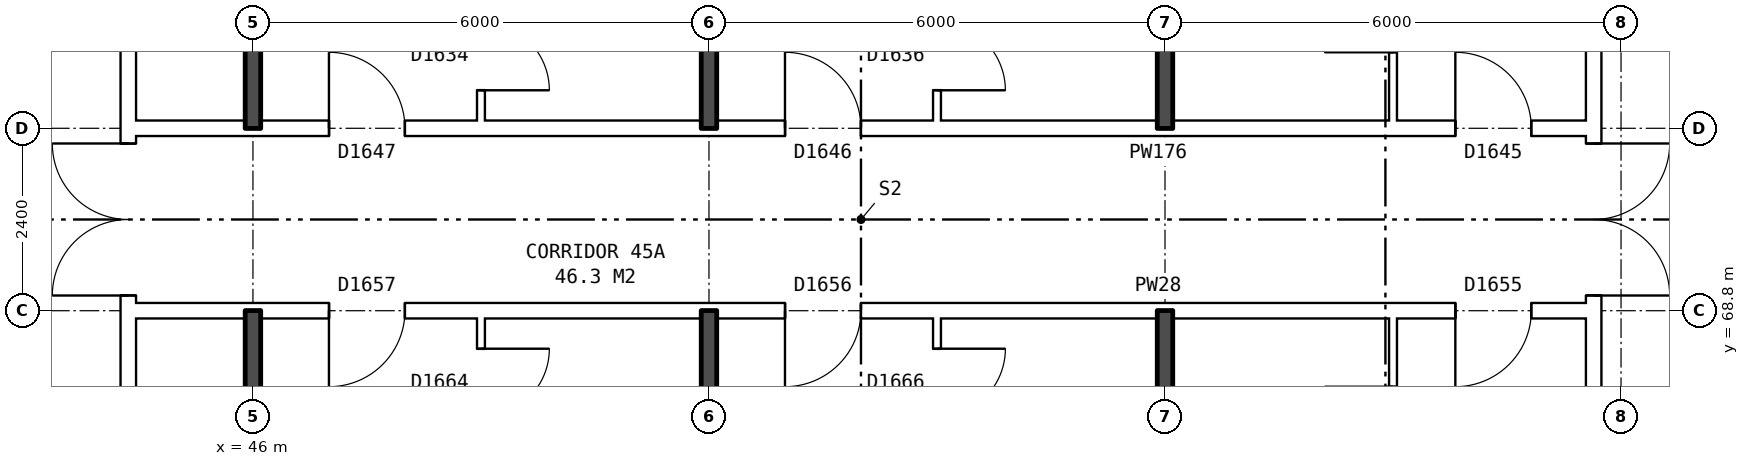
"""IFC4 building model, lengths in metres.
Left out: names, types, materials, properties, quantities, classifications, styles, units other than length and angle.
Written with IfcOpenShell. Run it as: python <this file> out.ifc"""

import sys

from ifc_helpers import new_model, si_unit, direction, frame, frame_2d, origin, place, context, subcontext, project, spatial, rectangle, extrude, element, fill, save


model = new_model("IFC4")
c1 = context("Model", 3, precision=1e-05, world=origin(), true_north=direction((0.0, 1.0)))
c2 = subcontext(c1, "Body", "Model", "MODEL_VIEW")
j1 = project(units=[si_unit("LENGTHUNIT", "METRE"), si_unit("PLANEANGLEUNIT", "RADIAN")], contexts=[c1])
p1 = place(None, origin())
s1 = spatial("IfcSite", under=j1, at=p1, CompositionType="ELEMENT")
p2 = place(p1, origin())
s2 = spatial("IfcBuilding", under=s1, at=p2, CompositionType="ELEMENT")
p3 = place(p2, frame((0.0, 0.0, 160.9)))
s3 = spatial("IfcBuildingStorey", under=s2, at=p3, CompositionType="ELEMENT", Elevation=160.9)
p4 = place(p3, frame((63.64, 63.9, 0.0), z_axis=(0.0, 0.0, 1.0), x_axis=(0.0, 1.0, 0.0)))
e1 = element("IfcWall", 1, at=p4, inside=s3, PredefinedType="PARTITIONING", context=c2, shape_type="SweptSolid", body=[
    extrude(rectangle(XDim=12.2, YDim=0.2, at=frame_2d((6.1, 0.0))), origin(), (0.0, 0.0, 1.0), 2.85),
])
p5 = place(p4, frame((5.1, 0.0, 0.0)))
e2 = element("IfcOpeningElement", 2, at=p5, cuts=e1, PredefinedType="OPENING", context=c2, shape_type="SweptSolid", body=[
    extrude(rectangle(XDim=2.0, YDim=2.1, at=frame_2d((1.0, 1.05))), frame((0.0, 0.11, 0.0), z_axis=(0.0, -1.0, 0.0), x_axis=(1.0, 0.0, 0.0)), (0.0, 0.0, 1.0), 0.22),
])
p6 = place(p3, frame((44.36, 63.9, 0.0), z_axis=(0.0, 0.0, 1.0), x_axis=(0.0, 1.0, 0.0)))
e3 = element("IfcWall", 3, at=p6, inside=s3, PredefinedType="PARTITIONING", context=c2, shape_type="SweptSolid", body=[
    extrude(rectangle(XDim=12.2, YDim=0.2, at=frame_2d((6.1, 0.0))), origin(), (0.0, 0.0, 1.0), 2.85),
])
p7 = place(p6, frame((5.1, 0.0, 0.0)))
e4 = element("IfcOpeningElement", 4, at=p7, cuts=e3, PredefinedType="OPENING", context=c2, shape_type="SweptSolid", body=[
    extrude(rectangle(XDim=2.0, YDim=2.1, at=frame_2d((1.0, 1.05))), frame((0.0, 0.11, 0.0), z_axis=(0.0, -1.0, 0.0), x_axis=(1.0, 0.0, 0.0)), (0.0, 0.0, 1.0), 0.22),
])
p8 = place(p3, frame((44.36, 68.8, 0.0), z_axis=(0.0, 0.0, 1.0), x_axis=(1.0, 0.0, 0.0)))
e5 = element("IfcWall", 5, at=p8, inside=s3, PredefinedType="PARTITIONING", context=c2, shape_type="SweptSolid", body=[
    extrude(rectangle(XDim=19.28, YDim=0.2, at=frame_2d((9.64, 0.0))), origin(), (0.0, 0.0, 1.0), 2.85),
])
p9 = place(p8, frame((17.46, 0.0, 0.0)))
e6 = element("IfcOpeningElement", 6, at=p9, cuts=e5, PredefinedType="OPENING", context=c2, shape_type="SweptSolid", body=[
    extrude(rectangle(XDim=1.0, YDim=2.1, at=frame_2d((0.5, 1.05))), frame((0.0, 0.11, 0.0), z_axis=(0.0, -1.0, 0.0), x_axis=(1.0, 0.0, 0.0)), (0.0, 0.0, 1.0), 0.22),
])
p10 = place(p8, frame((8.64, 0.0, 0.0)))
e7 = element("IfcOpeningElement", 7, at=p10, cuts=e5, PredefinedType="OPENING", context=c2, shape_type="SweptSolid", body=[
    extrude(rectangle(XDim=1.0, YDim=2.1, at=frame_2d((0.5, 1.05))), frame((0.0, 0.11, 0.0), z_axis=(0.0, -1.0, 0.0), x_axis=(1.0, 0.0, 0.0)), (0.0, 0.0, 1.0), 0.22),
])
p11 = place(p8, frame((2.64, 0.0, 0.0)))
e8 = element("IfcOpeningElement", 8, at=p11, cuts=e5, PredefinedType="OPENING", context=c2, shape_type="SweptSolid", body=[
    extrude(rectangle(XDim=1.0, YDim=2.1, at=frame_2d((0.5, 1.05))), frame((0.0, 0.11, 0.0), z_axis=(0.0, -1.0, 0.0), x_axis=(1.0, 0.0, 0.0)), (0.0, 0.0, 1.0), 0.22),
])
p12 = place(p3, frame((44.36, 71.2, 0.0), z_axis=(0.0, 0.0, 1.0), x_axis=(1.0, 0.0, 0.0)))
e9 = element("IfcWall", 9, at=p12, inside=s3, PredefinedType="PARTITIONING", context=c2, shape_type="SweptSolid", body=[
    extrude(rectangle(XDim=19.28, YDim=0.2, at=frame_2d((9.64, 0.0))), origin(), (0.0, 0.0, 1.0), 2.85),
])
p13 = place(p12, frame((17.46, 0.0, 0.0)))
e10 = element("IfcOpeningElement", 10, at=p13, cuts=e9, PredefinedType="OPENING", context=c2, shape_type="SweptSolid", body=[
    extrude(rectangle(XDim=1.0, YDim=2.1, at=frame_2d((0.5, 1.05))), frame((0.0, 0.11, 0.0), z_axis=(0.0, -1.0, 0.0), x_axis=(1.0, 0.0, 0.0)), (0.0, 0.0, 1.0), 0.22),
])
p14 = place(p12, frame((8.64, 0.0, 0.0)))
e11 = element("IfcOpeningElement", 11, at=p14, cuts=e9, PredefinedType="OPENING", context=c2, shape_type="SweptSolid", body=[
    extrude(rectangle(XDim=1.0, YDim=2.1, at=frame_2d((0.5, 1.05))), frame((0.0, 0.11, 0.0), z_axis=(0.0, -1.0, 0.0), x_axis=(1.0, 0.0, 0.0)), (0.0, 0.0, 1.0), 0.22),
])
p15 = place(p12, frame((2.64, 0.0, 0.0)))
e12 = element("IfcOpeningElement", 12, at=p15, cuts=e9, PredefinedType="OPENING", context=c2, shape_type="SweptSolid", body=[
    extrude(rectangle(XDim=1.0, YDim=2.1, at=frame_2d((0.5, 1.05))), frame((0.0, 0.11, 0.0), z_axis=(0.0, -1.0, 0.0), x_axis=(1.0, 0.0, 0.0)), (0.0, 0.0, 1.0), 0.22),
])
for number, where, z_axis, x_axis in (
    (13, (46.0, 63.8, 0.0), (0.0, 0.0, 1.0), (0.0, 1.0, 0.0)),
    (14, (46.0, 71.2, 0.0), (0.0, 0.0, 1.0), (0.0, 1.0, 0.0)),
):
    element("IfcWall", number, at=place(p3, frame(where, z_axis=z_axis, x_axis=x_axis)), inside=s3, PredefinedType="SOLIDWALL", context=c2, shape_type="SweptSolid", body=[
        extrude(rectangle(XDim=5.0, YDim=0.2, at=frame_2d((2.5, 0.0))), origin(), (0.0, 0.0, 1.0), 2.85),
    ])
p16 = place(p3, frame((49.0, 54.36, 0.0), z_axis=(0.0, 0.0, 1.0), x_axis=(0.0, 1.0, 0.0)))
e15 = element("IfcWall", 15, at=p16, inside=s3, PredefinedType="PARTITIONING", context=c2, shape_type="SweptSolid", body=[
    extrude(rectangle(XDim=14.34, YDim=0.1, at=frame_2d((7.17, 0.0))), origin(), (0.0, 0.0, 1.0), 2.85),
])
p17 = place(p16, frame((5.5, 0.0, 0.0)))
e16 = element("IfcOpeningElement", 16, at=p17, cuts=e15, PredefinedType="OPENING", context=c2, shape_type="SweptSolid", body=[
    extrude(rectangle(XDim=0.9, YDim=2.1, at=frame_2d((0.45, 1.05))), frame((0.0, 0.06, 0.0), z_axis=(0.0, -1.0, 0.0), x_axis=(1.0, 0.0, 0.0)), (0.0, 0.0, 1.0), 0.12),
])
p18 = place(p16, frame((13.04, 0.0, 0.0)))
e17 = element("IfcOpeningElement", 17, at=p18, cuts=e15, PredefinedType="OPENING", context=c2, shape_type="SweptSolid", body=[
    extrude(rectangle(XDim=0.9, YDim=2.1, at=frame_2d((0.45, 1.05))), frame((0.0, 0.06, 0.0), z_axis=(0.0, -1.0, 0.0), x_axis=(1.0, 0.0, 0.0)), (0.0, 0.0, 1.0), 0.12),
])
p19 = place(p3, frame((49.0, 71.3, 0.0), z_axis=(0.0, 0.0, 1.0), x_axis=(0.0, 1.0, 0.0)))
e18 = element("IfcWall", 18, at=p19, inside=s3, PredefinedType="PARTITIONING", context=c2, shape_type="SweptSolid", body=[
    extrude(rectangle(XDim=14.34, YDim=0.1, at=frame_2d((7.17, 0.0))), origin(), (0.0, 0.0, 1.0), 2.85),
])
p20 = place(p19, frame((7.94, 0.0, 0.0)))
e19 = element("IfcOpeningElement", 19, at=p20, cuts=e18, PredefinedType="OPENING", context=c2, shape_type="SweptSolid", body=[
    extrude(rectangle(XDim=0.9, YDim=2.1, at=frame_2d((0.45, 1.05))), frame((0.0, 0.06, 0.0), z_axis=(0.0, -1.0, 0.0), x_axis=(1.0, 0.0, 0.0)), (0.0, 0.0, 1.0), 0.12),
])
p21 = place(p19, frame((0.4, 0.0, 0.0)))
e20 = element("IfcOpeningElement", 20, at=p21, cuts=e18, PredefinedType="OPENING", context=c2, shape_type="SweptSolid", body=[
    extrude(rectangle(XDim=0.9, YDim=2.1, at=frame_2d((0.45, 1.05))), frame((0.0, 0.06, 0.0), z_axis=(0.0, -1.0, 0.0), x_axis=(1.0, 0.0, 0.0)), (0.0, 0.0, 1.0), 0.12),
])
for number, where, z_axis, x_axis in (
    (21, (52.0, 54.36, 0.0), (0.0, 0.0, 1.0), (0.0, 1.0, 0.0)),
    (22, (52.0, 71.2, 0.0), (0.0, 0.0, 1.0), (0.0, 1.0, 0.0)),
):
    element("IfcWall", number, at=place(p3, frame(where, z_axis=z_axis, x_axis=x_axis)), inside=s3, PredefinedType="SOLIDWALL", context=c2, shape_type="SweptSolid", body=[
        extrude(rectangle(XDim=14.44, YDim=0.2, at=frame_2d((7.22, 0.0))), origin(), (0.0, 0.0, 1.0), 2.85),
    ])
p22 = place(p3, frame((55.0, 54.36, 0.0), z_axis=(0.0, 0.0, 1.0), x_axis=(0.0, 1.0, 0.0)))
e23 = element("IfcWall", 23, at=p22, inside=s3, PredefinedType="PARTITIONING", context=c2, shape_type="SweptSolid", body=[
    extrude(rectangle(XDim=14.34, YDim=0.1, at=frame_2d((7.17, 0.0))), origin(), (0.0, 0.0, 1.0), 2.85),
])
p23 = place(p22, frame((5.5, 0.0, 0.0)))
e24 = element("IfcOpeningElement", 24, at=p23, cuts=e23, PredefinedType="OPENING", context=c2, shape_type="SweptSolid", body=[
    extrude(rectangle(XDim=0.9, YDim=2.1, at=frame_2d((0.45, 1.05))), frame((0.0, 0.06, 0.0), z_axis=(0.0, -1.0, 0.0), x_axis=(1.0, 0.0, 0.0)), (0.0, 0.0, 1.0), 0.12),
])
p24 = place(p22, frame((13.04, 0.0, 0.0)))
e25 = element("IfcOpeningElement", 25, at=p24, cuts=e23, PredefinedType="OPENING", context=c2, shape_type="SweptSolid", body=[
    extrude(rectangle(XDim=0.9, YDim=2.1, at=frame_2d((0.45, 1.05))), frame((0.0, 0.06, 0.0), z_axis=(0.0, -1.0, 0.0), x_axis=(1.0, 0.0, 0.0)), (0.0, 0.0, 1.0), 0.12),
])
p25 = place(p3, frame((55.0, 71.3, 0.0), z_axis=(0.0, 0.0, 1.0), x_axis=(0.0, 1.0, 0.0)))
e26 = element("IfcWall", 26, at=p25, inside=s3, PredefinedType="PARTITIONING", context=c2, shape_type="SweptSolid", body=[
    extrude(rectangle(XDim=14.34, YDim=0.1, at=frame_2d((7.17, 0.0))), origin(), (0.0, 0.0, 1.0), 2.85),
])
p26 = place(p25, frame((6.74, 0.0, 0.0)))
e27 = element("IfcOpeningElement", 27, at=p26, cuts=e26, PredefinedType="OPENING", context=c2, shape_type="SweptSolid", body=[
    extrude(rectangle(XDim=0.9, YDim=2.1, at=frame_2d((0.45, 1.05))), frame((0.0, 0.06, 0.0), z_axis=(0.0, -1.0, 0.0), x_axis=(1.0, 0.0, 0.0)), (0.0, 0.0, 1.0), 0.12),
])
p27 = place(p25, frame((0.4, 0.0, 0.0)))
e28 = element("IfcOpeningElement", 28, at=p27, cuts=e26, PredefinedType="OPENING", context=c2, shape_type="SweptSolid", body=[
    extrude(rectangle(XDim=0.9, YDim=2.1, at=frame_2d((0.45, 1.05))), frame((0.0, 0.06, 0.0), z_axis=(0.0, -1.0, 0.0), x_axis=(1.0, 0.0, 0.0)), (0.0, 0.0, 1.0), 0.12),
])
for number, where, z_axis, x_axis in (
    (29, (58.0, 54.36, 0.0), (0.0, 0.0, 1.0), (0.0, 1.0, 0.0)),
    (30, (58.0, 71.2, 0.0), (0.0, 0.0, 1.0), (0.0, 1.0, 0.0)),
):
    element("IfcWall", number, at=place(p3, frame(where, z_axis=z_axis, x_axis=x_axis)), inside=s3, PredefinedType="SOLIDWALL", context=c2, shape_type="SweptSolid", body=[
        extrude(rectangle(XDim=14.44, YDim=0.2, at=frame_2d((7.22, 0.0))), origin(), (0.0, 0.0, 1.0), 2.85),
    ])
p28 = place(p3, frame((61.0, 54.36, 0.0), z_axis=(0.0, 0.0, 1.0), x_axis=(0.0, 1.0, 0.0)))
e31 = element("IfcWall", 31, at=p28, inside=s3, PredefinedType="PARTITIONING", context=c2, shape_type="SweptSolid", body=[
    extrude(rectangle(XDim=14.34, YDim=0.1, at=frame_2d((7.17, 0.0))), origin(), (0.0, 0.0, 1.0), 2.85),
])
p29 = place(p28, frame((6.7, 0.0, 0.0)))
e32 = element("IfcOpeningElement", 32, at=p29, cuts=e31, PredefinedType="OPENING", context=c2, shape_type="SweptSolid", body=[
    extrude(rectangle(XDim=0.9, YDim=2.1, at=frame_2d((0.45, 1.05))), frame((0.0, 0.06, 0.0), z_axis=(0.0, -1.0, 0.0), x_axis=(1.0, 0.0, 0.0)), (0.0, 0.0, 1.0), 0.12),
])
p30 = place(p28, frame((12.54, 0.0, 0.0)))
e33 = element("IfcOpeningElement", 33, at=p30, cuts=e31, PredefinedType="OPENING", context=c2, shape_type="SweptSolid", body=[
    extrude(rectangle(XDim=0.9, YDim=2.1, at=frame_2d((0.45, 1.05))), frame((0.0, 0.06, 0.0), z_axis=(0.0, -1.0, 0.0), x_axis=(1.0, 0.0, 0.0)), (0.0, 0.0, 1.0), 0.12),
])
p31 = place(p3, frame((61.0, 71.3, 0.0), z_axis=(0.0, 0.0, 1.0), x_axis=(0.0, 1.0, 0.0)))
e34 = element("IfcWall", 34, at=p31, inside=s3, PredefinedType="PARTITIONING", context=c2, shape_type="SweptSolid", body=[
    extrude(rectangle(XDim=14.34, YDim=0.1, at=frame_2d((7.17, 0.0))), origin(), (0.0, 0.0, 1.0), 2.85),
])
p32 = place(p31, frame((7.94, 0.0, 0.0)))
e35 = element("IfcOpeningElement", 35, at=p32, cuts=e34, PredefinedType="OPENING", context=c2, shape_type="SweptSolid", body=[
    extrude(rectangle(XDim=0.9, YDim=2.1, at=frame_2d((0.45, 1.05))), frame((0.0, 0.06, 0.0), z_axis=(0.0, -1.0, 0.0), x_axis=(1.0, 0.0, 0.0)), (0.0, 0.0, 1.0), 0.12),
])
p33 = place(p31, frame((0.9, 0.0, 0.0)))
e36 = element("IfcOpeningElement", 36, at=p33, cuts=e34, PredefinedType="OPENING", context=c2, shape_type="SweptSolid", body=[
    extrude(rectangle(XDim=0.9, YDim=2.1, at=frame_2d((0.45, 1.05))), frame((0.0, 0.06, 0.0), z_axis=(0.0, -1.0, 0.0), x_axis=(1.0, 0.0, 0.0)), (0.0, 0.0, 1.0), 0.12),
])
p34 = place(p5, frame((2.0, 0.0, 0.0), z_axis=(0.0, 0.0, 1.0), x_axis=(-1.0, 0.0, 0.0)))
e37 = element("IfcDoor", 37, at=p34, inside=s3, OperationType="DOUBLE_DOOR_SINGLE_SWING", PredefinedType="DOOR", context=c2, shape_type="SweptSolid", body=[
    extrude(rectangle(XDim=2.0, YDim=2.1, at=frame_2d((1.0, 1.05))), frame((0.0, 0.025, 0.0), z_axis=(0.0, -1.0, 0.0), x_axis=(1.0, 0.0, 0.0)), (0.0, 0.0, 1.0), 0.05),
])
fill(e2, e37)
p35 = place(p7, origin())
e38 = element("IfcDoor", 38, at=p35, inside=s3, OperationType="DOUBLE_DOOR_SINGLE_SWING", PredefinedType="DOOR", context=c2, shape_type="SweptSolid", body=[
    extrude(rectangle(XDim=2.0, YDim=2.1, at=frame_2d((1.0, 1.05))), frame((0.0, 0.025, 0.0), z_axis=(0.0, -1.0, 0.0), x_axis=(1.0, 0.0, 0.0)), (0.0, 0.0, 1.0), 0.05),
])
fill(e4, e38)
p36 = place(p9, frame((1.0, 0.0, 0.0), z_axis=(0.0, 0.0, 1.0), x_axis=(-1.0, 0.0, 0.0)))
e39 = element("IfcDoor", 39, at=p36, inside=s3, OperationType="SINGLE_SWING_RIGHT", PredefinedType="DOOR", context=c2, shape_type="SweptSolid", body=[
    extrude(rectangle(XDim=1.0, YDim=2.1, at=frame_2d((0.5, 1.05))), frame((0.0, 0.025, 0.0), z_axis=(0.0, -1.0, 0.0), x_axis=(1.0, 0.0, 0.0)), (0.0, 0.0, 1.0), 0.05),
])
fill(e6, e39)
p37 = place(p10, frame((1.0, 0.0, 0.0), z_axis=(0.0, 0.0, 1.0), x_axis=(-1.0, 0.0, 0.0)))
e40 = element("IfcDoor", 40, at=p37, inside=s3, OperationType="SINGLE_SWING_RIGHT", PredefinedType="DOOR", context=c2, shape_type="SweptSolid", body=[
    extrude(rectangle(XDim=1.0, YDim=2.1, at=frame_2d((0.5, 1.05))), frame((0.0, 0.025, 0.0), z_axis=(0.0, -1.0, 0.0), x_axis=(1.0, 0.0, 0.0)), (0.0, 0.0, 1.0), 0.05),
])
fill(e7, e40)
p38 = place(p24, frame((0.9, 0.0, 0.0), z_axis=(0.0, 0.0, 1.0), x_axis=(-1.0, 0.0, 0.0)))
e41 = element("IfcDoor", 41, at=p38, inside=s3, OperationType="SINGLE_SWING_LEFT", PredefinedType="DOOR", context=c2, shape_type="SweptSolid", body=[
    extrude(rectangle(XDim=0.9, YDim=2.1, at=frame_2d((0.45, 1.05))), frame((0.0, 0.025, 0.0), z_axis=(0.0, -1.0, 0.0), x_axis=(1.0, 0.0, 0.0)), (0.0, 0.0, 1.0), 0.05),
])
fill(e25, e41)
p39 = place(p11, frame((1.0, 0.0, 0.0), z_axis=(0.0, 0.0, 1.0), x_axis=(-1.0, 0.0, 0.0)))
e42 = element("IfcDoor", 42, at=p39, inside=s3, OperationType="SINGLE_SWING_RIGHT", PredefinedType="DOOR", context=c2, shape_type="SweptSolid", body=[
    extrude(rectangle(XDim=1.0, YDim=2.1, at=frame_2d((0.5, 1.05))), frame((0.0, 0.025, 0.0), z_axis=(0.0, -1.0, 0.0), x_axis=(1.0, 0.0, 0.0)), (0.0, 0.0, 1.0), 0.05),
])
fill(e8, e42)
p40 = place(p18, frame((0.9, 0.0, 0.0), z_axis=(0.0, 0.0, 1.0), x_axis=(-1.0, 0.0, 0.0)))
e43 = element("IfcDoor", 43, at=p40, inside=s3, OperationType="SINGLE_SWING_LEFT", PredefinedType="DOOR", context=c2, shape_type="SweptSolid", body=[
    extrude(rectangle(XDim=0.9, YDim=2.1, at=frame_2d((0.45, 1.05))), frame((0.0, 0.025, 0.0), z_axis=(0.0, -1.0, 0.0), x_axis=(1.0, 0.0, 0.0)), (0.0, 0.0, 1.0), 0.05),
])
fill(e17, e43)
p41 = place(p13, origin())
e44 = element("IfcDoor", 44, at=p41, inside=s3, OperationType="SINGLE_SWING_LEFT", PredefinedType="DOOR", context=c2, shape_type="SweptSolid", body=[
    extrude(rectangle(XDim=1.0, YDim=2.1, at=frame_2d((0.5, 1.05))), frame((0.0, 0.025, 0.0), z_axis=(0.0, -1.0, 0.0), x_axis=(1.0, 0.0, 0.0)), (0.0, 0.0, 1.0), 0.05),
])
fill(e10, e44)
p42 = place(p14, origin())
e45 = element("IfcDoor", 45, at=p42, inside=s3, OperationType="SINGLE_SWING_LEFT", PredefinedType="DOOR", context=c2, shape_type="SweptSolid", body=[
    extrude(rectangle(XDim=1.0, YDim=2.1, at=frame_2d((0.5, 1.05))), frame((0.0, 0.025, 0.0), z_axis=(0.0, -1.0, 0.0), x_axis=(1.0, 0.0, 0.0)), (0.0, 0.0, 1.0), 0.05),
])
fill(e11, e45)
p43 = place(p27, frame((0.9, 0.0, 0.0), z_axis=(0.0, 0.0, 1.0), x_axis=(-1.0, 0.0, 0.0)))
e46 = element("IfcDoor", 46, at=p43, inside=s3, OperationType="SINGLE_SWING_RIGHT", PredefinedType="DOOR", context=c2, shape_type="SweptSolid", body=[
    extrude(rectangle(XDim=0.9, YDim=2.1, at=frame_2d((0.45, 1.05))), frame((0.0, 0.025, 0.0), z_axis=(0.0, -1.0, 0.0), x_axis=(1.0, 0.0, 0.0)), (0.0, 0.0, 1.0), 0.05),
])
fill(e28, e46)
p44 = place(p15, origin())
e47 = element("IfcDoor", 47, at=p44, inside=s3, OperationType="SINGLE_SWING_LEFT", PredefinedType="DOOR", context=c2, shape_type="SweptSolid", body=[
    extrude(rectangle(XDim=1.0, YDim=2.1, at=frame_2d((0.5, 1.05))), frame((0.0, 0.025, 0.0), z_axis=(0.0, -1.0, 0.0), x_axis=(1.0, 0.0, 0.0)), (0.0, 0.0, 1.0), 0.05),
])
fill(e12, e47)
p45 = place(p21, frame((0.9, 0.0, 0.0), z_axis=(0.0, 0.0, 1.0), x_axis=(-1.0, 0.0, 0.0)))
e48 = element("IfcDoor", 48, at=p45, inside=s3, OperationType="SINGLE_SWING_RIGHT", PredefinedType="DOOR", context=c2, shape_type="SweptSolid", body=[
    extrude(rectangle(XDim=0.9, YDim=2.1, at=frame_2d((0.45, 1.05))), frame((0.0, 0.025, 0.0), z_axis=(0.0, -1.0, 0.0), x_axis=(1.0, 0.0, 0.0)), (0.0, 0.0, 1.0), 0.05),
])
fill(e20, e48)
save(model, sys.argv[1])
